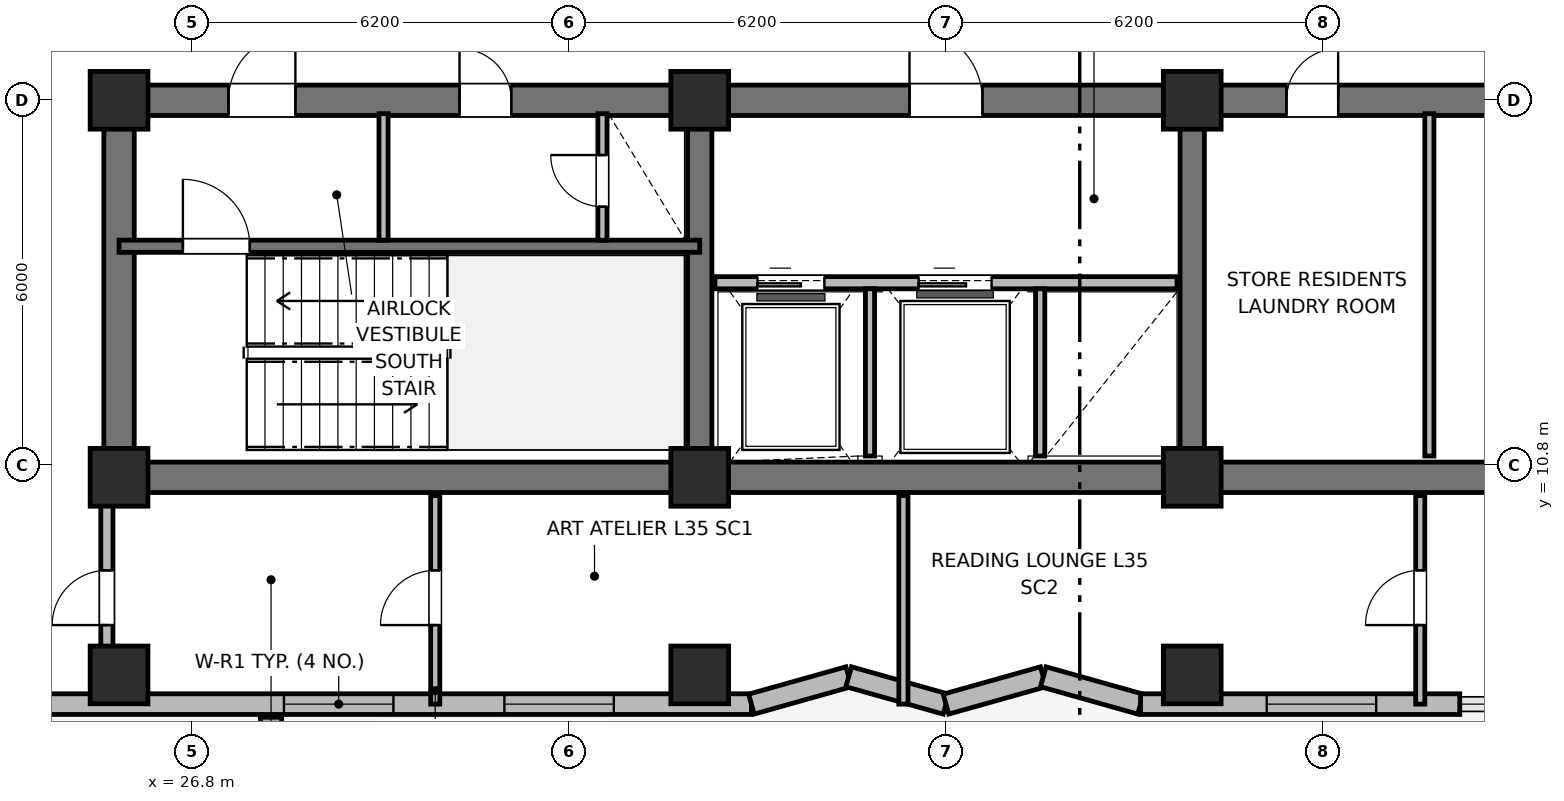
"""IFC4 building model, lengths in metres.
Left out: names, types, materials, properties, quantities, classifications, styles, units other than length and angle.
Written with IfcOpenShell. Run it as: python <this file> out.ifc"""

import sys

from ifc_helpers import new_model, si_unit, direction, frame, frame_2d, origin, origin_2d, place, context, subcontext, project, spatial, rectangle, extrude, element, fill, save


model = new_model("IFC4")
c1 = context("Model", 3, precision=1e-05, world=origin(), true_north=direction((0.0, 1.0)))
c2 = subcontext(c1, "Body", "Model", "MODEL_VIEW")
j1 = project(units=[si_unit("LENGTHUNIT", "METRE"), si_unit("PLANEANGLEUNIT", "RADIAN")], contexts=[c1])
p1 = place(None, origin())
s1 = spatial("IfcSite", under=j1, at=p1, CompositionType="ELEMENT")
p2 = place(p1, origin())
s2 = spatial("IfcBuilding", under=s1, at=p2, CompositionType="ELEMENT")
p3 = place(p2, frame((0.0, 0.0, 143.6)))
s3 = spatial("IfcBuildingStorey", under=s2, at=p3, CompositionType="ELEMENT", Elevation=143.6)
p4 = place(p3, frame((52.8, 10.6, 0.0), z_axis=(0.0, 0.0, 1.0), x_axis=(-1.0, 0.0, 0.0)))
e1 = element("IfcWall", 1, at=p4, inside=s3, PredefinedType="SHEAR", context=c2, shape_type="SweptSolid", body=[
    extrude(rectangle(XDim=27.2, YDim=0.5, at=frame_2d((13.6, 0.0))), origin(), (0.0, 0.0, 1.0), 4.2),
])
p5 = place(p3, frame((25.6, 10.85, 0.0), z_axis=(0.0, 0.0, 1.0), x_axis=(0.0, 1.0, 0.0)))
e2 = element("IfcWall", 2, at=p5, inside=s3, PredefinedType="SHEAR", context=c2, shape_type="SweptSolid", body=[
    extrude(rectangle(XDim=5.7, YDim=0.5, at=frame_2d((2.85, 0.0))), origin(), (0.0, 0.0, 1.0), 4.2),
])
p6 = place(p3, frame((25.6, 16.8, 0.0), z_axis=(0.0, 0.0, 1.0), x_axis=(1.0, 0.0, 0.0)))
e3 = element("IfcWall", 3, at=p6, inside=s3, PredefinedType="SHEAR", context=c2, shape_type="SweptSolid", body=[
    extrude(rectangle(XDim=27.2, YDim=0.5, at=frame_2d((13.6, 0.0))), origin(), (0.0, 0.0, 1.0), 4.2),
])
p7 = place(p6, frame((1.8, 0.0, 0.0)))
e4 = element("IfcOpeningElement", 4, at=p7, cuts=e3, PredefinedType="OPENING", context=c2, shape_type="SweptSolid", body=[
    extrude(rectangle(XDim=1.1, YDim=2.15, at=frame_2d((0.55, 1.075))), frame((0.0, 0.26, 0.0), z_axis=(0.0, -1.0, 0.0), x_axis=(1.0, 0.0, 0.0)), (0.0, 0.0, 1.0), 0.52),
])
p8 = place(p6, frame((5.6, 0.0, 0.0)))
e5 = element("IfcOpeningElement", 5, at=p8, cuts=e3, PredefinedType="OPENING", context=c2, shape_type="SweptSolid", body=[
    extrude(rectangle(XDim=0.85, YDim=2.1, at=frame_2d((0.425, 1.05))), frame((0.0, 0.26, 0.0), z_axis=(0.0, -1.0, 0.0), x_axis=(1.0, 0.0, 0.0)), (0.0, 0.0, 1.0), 0.52),
])
p9 = place(p6, frame((13.0, 0.0, 0.0)))
e6 = element("IfcOpeningElement", 6, at=p9, cuts=e3, PredefinedType="OPENING", context=c2, shape_type="SweptSolid", body=[
    extrude(rectangle(XDim=1.2, YDim=2.15, at=frame_2d((0.6, 1.075))), frame((0.0, 0.26, 0.0), z_axis=(0.0, -1.0, 0.0), x_axis=(1.0, 0.0, 0.0)), (0.0, 0.0, 1.0), 0.52),
])
p10 = place(p6, frame((19.2, 0.0, 0.0)))
e7 = element("IfcOpeningElement", 7, at=p10, cuts=e3, PredefinedType="OPENING", context=c2, shape_type="SweptSolid", body=[
    extrude(rectangle(XDim=0.85, YDim=2.1, at=frame_2d((0.425, 1.05))), frame((0.0, 0.26, 0.0), z_axis=(0.0, -1.0, 0.0), x_axis=(1.0, 0.0, 0.0)), (0.0, 0.0, 1.0), 0.52),
])
p11 = place(p6, frame((23.8, 0.0, 0.0)))
e8 = element("IfcOpeningElement", 8, at=p11, cuts=e3, PredefinedType="OPENING", context=c2, shape_type="SweptSolid", body=[
    extrude(rectangle(XDim=0.9, YDim=2.1, at=frame_2d((0.45, 1.05))), frame((0.0, 0.26, 0.0), z_axis=(0.0, -1.0, 0.0), x_axis=(1.0, 0.0, 0.0)), (0.0, 0.0, 1.0), 0.52),
])
for number, where, z_axis, x_axis in (
    (9, (35.15, 10.85, 0.0), (0.0, 0.0, 1.0), (0.0, 1.0, 0.0)),
    (10, (43.25, 10.85, 0.0), (0.0, 0.0, 1.0), (0.0, 1.0, 0.0)),
):
    element("IfcWall", number, at=place(p3, frame(where, z_axis=z_axis, x_axis=x_axis)), inside=s3, PredefinedType="SHEAR", context=c2, shape_type="SweptSolid", body=[
        extrude(rectangle(XDim=5.7, YDim=0.4, at=frame_2d((2.85, 0.0))), origin(), (0.0, 0.0, 1.0), 4.2),
    ])
for number, where, z_axis, x_axis in (
    (11, (25.6, 10.6, 0.0), (0.0, 0.0, 1.0), (1.0, 0.0, 0.0)),
    (12, (25.6, 16.8, 0.0), (0.0, 0.0, 1.0), (1.0, 0.0, 0.0)),
    (13, (35.15, 10.6, 0.0), (0.0, 0.0, 1.0), (1.0, 0.0, 0.0)),
    (14, (35.15, 16.8, 0.0), (0.0, 0.0, 1.0), (1.0, 0.0, 0.0)),
    (15, (43.25, 10.6, 0.0), (0.0, 0.0, 1.0), (1.0, 0.0, 0.0)),
    (16, (43.25, 16.8, 0.0), (0.0, 0.0, 1.0), (1.0, 0.0, 0.0)),
    (17, (25.6, 7.35, 0.0), (0.0, 0.0, 1.0), (1.0, 0.0, 0.0)),
    (18, (35.15, 7.35, 0.0), (0.0, 0.0, 1.0), (1.0, 0.0, 0.0)),
    (19, (43.25, 7.35, 0.0), (0.0, 0.0, 1.0), (1.0, 0.0, 0.0)),
):
    element("IfcColumn", number, at=place(p3, frame(where, z_axis=z_axis, x_axis=x_axis)), inside=s3, PredefinedType="COLUMN", context=c2, shape_type="SweptSolid", body=[
        extrude(rectangle(XDim=0.95, YDim=0.95, at=origin_2d()), origin(), (0.0, 0.0, 1.0), 4.2),
    ])
p12 = place(p3, frame((20.2, 6.87, 0.0), z_axis=(0.0, 0.0, 1.0), x_axis=(1.0, 0.0, 0.0)))
e20 = element("IfcWall", 20, at=p12, inside=s3, PredefinedType="SOLIDWALL", context=c2, shape_type="SweptSolid", body=[
    extrude(rectangle(XDim=15.8, YDim=0.34, at=frame_2d((7.9, 0.0))), origin(), (0.0, 0.0, 1.0), 3.22),
])
p13 = place(p12, frame((8.113, 0.0, 0.85)))
e21 = element("IfcOpeningElement", 21, at=p13, cuts=e20, PredefinedType="OPENING", context=c2, shape_type="SweptSolid", body=[
    extrude(rectangle(XDim=1.8, YDim=1.85, at=frame_2d((0.9, 0.925))), frame((0.0, 0.18, 0.0), z_axis=(0.0, -1.0, 0.0), x_axis=(1.0, 0.0, 0.0)), (0.0, 0.0, 1.0), 0.36),
])
p14 = place(p12, frame((11.738, 0.0, 0.85)))
e22 = element("IfcOpeningElement", 22, at=p14, cuts=e20, PredefinedType="OPENING", context=c2, shape_type="SweptSolid", body=[
    extrude(rectangle(XDim=1.8, YDim=1.85, at=frame_2d((0.9, 0.925))), frame((0.0, 0.18, 0.0), z_axis=(0.0, -1.0, 0.0), x_axis=(1.0, 0.0, 0.0)), (0.0, 0.0, 1.0), 0.36),
])
p15 = place(p3, frame((36.0, 6.87, 0.0), z_axis=(0.0, 0.0, 1.0), x_axis=(0.962662902433, 0.270703040766, 0.0)))
e23 = element("IfcWall", 23, at=p15, inside=s3, PredefinedType="SOLIDWALL", context=c2, shape_type="SweptSolid", body=[
    extrude(rectangle(XDim=1.662, YDim=0.34, at=frame_2d((0.831, 0.0))), origin(), (0.0, 0.0, 1.0), 3.22),
])
p16 = place(p3, frame((37.6, 7.32, 0.0), z_axis=(0.0, 0.0, 1.0), x_axis=(0.962652136636, -0.270741322725, 0.0)))
e24 = element("IfcWall", 24, at=p16, inside=s3, PredefinedType="SOLIDWALL", context=c2, shape_type="SweptSolid", body=[
    extrude(rectangle(XDim=1.662, YDim=0.34, at=frame_2d((0.831, 0.0))), origin(), (0.0, 0.0, 1.0), 3.22),
])
p17 = place(p3, frame((39.2, 6.87, 0.0), z_axis=(0.0, 0.0, 1.0), x_axis=(0.962662902433, 0.270703040766, 0.0)))
e25 = element("IfcWall", 25, at=p17, inside=s3, PredefinedType="SOLIDWALL", context=c2, shape_type="SweptSolid", body=[
    extrude(rectangle(XDim=1.662, YDim=0.34, at=frame_2d((0.831, 0.0))), origin(), (0.0, 0.0, 1.0), 3.22),
])
p18 = place(p3, frame((40.8, 7.32, 0.0), z_axis=(0.0, 0.0, 1.0), x_axis=(0.962652136636, -0.270741322725, 0.0)))
e26 = element("IfcWall", 26, at=p18, inside=s3, PredefinedType="SOLIDWALL", context=c2, shape_type="SweptSolid", body=[
    extrude(rectangle(XDim=1.662, YDim=0.34, at=frame_2d((0.831, 0.0))), origin(), (0.0, 0.0, 1.0), 3.22),
])
p19 = place(p3, frame((42.4, 6.87, 0.0), z_axis=(0.0, 0.0, 1.0), x_axis=(1.0, 0.0, 0.0)))
e27 = element("IfcWall", 27, at=p19, inside=s3, PredefinedType="SOLIDWALL", context=c2, shape_type="SweptSolid", body=[
    extrude(rectangle(XDim=5.25, YDim=0.34, at=frame_2d((2.625, 0.0))), origin(), (0.0, 0.0, 1.0), 3.22),
])
p20 = place(p19, frame((2.075, 0.0, 0.85)))
e28 = element("IfcOpeningElement", 28, at=p20, cuts=e27, PredefinedType="OPENING", context=c2, shape_type="SweptSolid", body=[
    extrude(rectangle(XDim=1.8, YDim=1.85, at=frame_2d((0.9, 0.925))), frame((0.0, 0.18, 0.0), z_axis=(0.0, -1.0, 0.0), x_axis=(1.0, 0.0, 0.0)), (0.0, 0.0, 1.0), 0.36),
])
p21 = place(p3, frame((25.6, 14.4, 0.0), z_axis=(0.0, 0.0, 1.0), x_axis=(1.0, 0.0, 0.0)))
e29 = element("IfcWall", 29, at=p21, inside=s3, PredefinedType="SHEAR", context=c2, shape_type="SweptSolid", body=[
    extrude(rectangle(XDim=9.55, YDim=0.2, at=frame_2d((4.775, 0.0))), origin(), (0.0, 0.0, 1.0), 4.2),
])
p22 = place(p21, frame((1.05, 0.0, 0.0)))
e30 = element("IfcOpeningElement", 30, at=p22, cuts=e29, PredefinedType="OPENING", context=c2, shape_type="SweptSolid", body=[
    extrude(rectangle(XDim=1.1, YDim=2.15, at=frame_2d((0.55, 1.075))), frame((0.0, 0.11, 0.0), z_axis=(0.0, -1.0, 0.0), x_axis=(1.0, 0.0, 0.0)), (0.0, 0.0, 1.0), 0.22),
])
p23 = place(p3, frame((29.95, 14.5, 0.0), z_axis=(0.0, 0.0, 1.0), x_axis=(0.0, 1.0, 0.0)))
e31 = element("IfcWall", 31, at=p23, inside=s3, PredefinedType="PARTITIONING", context=c2, shape_type="SweptSolid", body=[
    extrude(rectangle(XDim=2.08, YDim=0.15, at=frame_2d((1.04, 0.0))), origin(), (0.0, 0.0, 1.0), 3.05),
])
p24 = place(p3, frame((33.55, 14.5, 0.0), z_axis=(0.0, 0.0, 1.0), x_axis=(0.0, 1.0, 0.0)))
e32 = element("IfcWall", 32, at=p24, inside=s3, PredefinedType="PARTITIONING", context=c2, shape_type="SweptSolid", body=[
    extrude(rectangle(XDim=2.08, YDim=0.15, at=frame_2d((1.04, 0.0))), origin(), (0.0, 0.0, 1.0), 3.05),
])
p25 = place(p24, frame((0.55, 0.0, 0.0)))
e33 = element("IfcOpeningElement", 33, at=p25, cuts=e32, PredefinedType="OPENING", context=c2, shape_type="SweptSolid", body=[
    extrude(rectangle(XDim=0.85, YDim=2.05, at=frame_2d((0.425, 1.025))), frame((0.0, 0.085, 0.0), z_axis=(0.0, -1.0, 0.0), x_axis=(1.0, 0.0, 0.0)), (0.0, 0.0, 1.0), 0.17),
])
p26 = place(p3, frame((35.4, 13.8, 0.0), z_axis=(0.0, 0.0, 1.0), x_axis=(1.0, 0.0, 0.0)))
e34 = element("IfcWall", 34, at=p26, inside=s3, PredefinedType="PARTITIONING", context=c2, shape_type="SweptSolid", body=[
    extrude(rectangle(XDim=7.6, YDim=0.2, at=frame_2d((3.8, 0.0))), origin(), (0.0, 0.0, 1.0), 2.82),
])
p27 = place(p26, frame((0.7, 0.0, 0.0)))
e35 = element("IfcOpeningElement", 35, at=p27, cuts=e34, PredefinedType="OPENING", context=c2, shape_type="SweptSolid", body=[
    extrude(rectangle(XDim=1.1, YDim=2.15, at=frame_2d((0.55, 1.075))), frame((0.0, 0.11, 0.0), z_axis=(0.0, -1.0, 0.0), x_axis=(1.0, 0.0, 0.0)), (0.0, 0.0, 1.0), 0.22),
])
p28 = place(p26, frame((3.35, 0.0, 0.0)))
e36 = element("IfcOpeningElement", 36, at=p28, cuts=e34, PredefinedType="OPENING", context=c2, shape_type="SweptSolid", body=[
    extrude(rectangle(XDim=1.2, YDim=2.15, at=frame_2d((0.6, 1.075))), frame((0.0, 0.11, 0.0), z_axis=(0.0, -1.0, 0.0), x_axis=(1.0, 0.0, 0.0)), (0.0, 0.0, 1.0), 0.22),
])
for number, where, z_axis, x_axis in (
    (37, (37.95, 10.95, 0.0), (0.0, 0.0, 1.0), (0.0, 1.0, 0.0)),
    (38, (40.75, 10.95, 0.0), (0.0, 0.0, 1.0), (0.0, 1.0, 0.0)),
):
    element("IfcWall", number, at=place(p3, frame(where, z_axis=z_axis, x_axis=x_axis)), inside=s3, PredefinedType="PARTITIONING", context=c2, shape_type="SweptSolid", body=[
        extrude(rectangle(XDim=2.75, YDim=0.15, at=frame_2d((1.375, 0.0))), origin(), (0.0, 0.0, 1.0), 3.05),
    ])
p29 = place(p3, frame((47.15, 10.95, 0.0), z_axis=(0.0, 0.0, 1.0), x_axis=(0.0, 1.0, 0.0)))
e39 = element("IfcWall", 39, at=p29, inside=s3, PredefinedType="PARTITIONING", context=c2, shape_type="SweptSolid", body=[
    extrude(rectangle(XDim=5.63, YDim=0.15, at=frame_2d((2.815, 0.0))), origin(), (0.0, 0.0, 1.0), 3.05),
])
p30 = place(p3, frame((30.8, 6.87, 0.0), z_axis=(0.0, 0.0, 1.0), x_axis=(0.0, 1.0, 0.0)))
e40 = element("IfcWall", 40, at=p30, inside=s3, PredefinedType="PARTITIONING", context=c2, shape_type="SweptSolid", body=[
    extrude(rectangle(XDim=3.43, YDim=0.15, at=frame_2d((1.715, 0.0))), origin(), (0.0, 0.0, 1.0), 3.05),
])
p31 = place(p30, frame((1.3, 0.0, 0.0)))
e41 = element("IfcOpeningElement", 41, at=p31, cuts=e40, PredefinedType="OPENING", context=c2, shape_type="SweptSolid", body=[
    extrude(rectangle(XDim=0.9, YDim=2.1, at=frame_2d((0.45, 1.05))), frame((0.0, 0.085, 0.0), z_axis=(0.0, -1.0, 0.0), x_axis=(1.0, 0.0, 0.0)), (0.0, 0.0, 1.0), 0.17),
])
p32 = place(p3, frame((38.5, 6.87, 0.0), z_axis=(0.0, 0.0, 1.0), x_axis=(0.0, 1.0, 0.0)))
e42 = element("IfcWall", 42, at=p32, inside=s3, PredefinedType="PARTITIONING", context=c2, shape_type="SweptSolid", body=[
    extrude(rectangle(XDim=3.43, YDim=0.15, at=frame_2d((1.715, 0.0))), origin(), (0.0, 0.0, 1.0), 3.05),
])
p33 = place(p3, frame((47.0, 6.87, 0.0), z_axis=(0.0, 0.0, 1.0), x_axis=(0.0, 1.0, 0.0)))
e43 = element("IfcWall", 43, at=p33, inside=s3, PredefinedType="PARTITIONING", context=c2, shape_type="SweptSolid", body=[
    extrude(rectangle(XDim=3.43, YDim=0.15, at=frame_2d((1.715, 0.0))), origin(), (0.0, 0.0, 1.0), 3.05),
])
p34 = place(p33, frame((1.3, 0.0, 0.0)))
e44 = element("IfcOpeningElement", 44, at=p34, cuts=e43, PredefinedType="OPENING", context=c2, shape_type="SweptSolid", body=[
    extrude(rectangle(XDim=0.9, YDim=2.1, at=frame_2d((0.45, 1.05))), frame((0.0, 0.085, 0.0), z_axis=(0.0, -1.0, 0.0), x_axis=(1.0, 0.0, 0.0)), (0.0, 0.0, 1.0), 0.17),
])
p35 = place(p3, frame((25.4, 7.52, 0.0), z_axis=(0.0, 0.0, 1.0), x_axis=(0.0, 1.0, 0.0)))
e45 = element("IfcWall", 45, at=p35, inside=s3, PredefinedType="PARTITIONING", context=c2, shape_type="SweptSolid", body=[
    extrude(rectangle(XDim=2.78, YDim=0.2, at=frame_2d((1.39, 0.0))), origin(), (0.0, 0.0, 1.0), 3.05),
])
p36 = place(p35, frame((0.65, 0.0, 0.0)))
e46 = element("IfcOpeningElement", 46, at=p36, cuts=e45, PredefinedType="OPENING", context=c2, shape_type="SweptSolid", body=[
    extrude(rectangle(XDim=0.9, YDim=2.1, at=frame_2d((0.45, 1.05))), frame((0.0, 0.11, 0.0), z_axis=(0.0, -1.0, 0.0), x_axis=(1.0, 0.0, 0.0)), (0.0, 0.0, 1.0), 0.22),
])
p37 = place(p13, origin())
e47 = element("IfcWindow", 47, at=p37, inside=s3, PartitioningType="SINGLE_PANEL", PredefinedType="WINDOW", context=c2, shape_type="SweptSolid", body=[
    extrude(rectangle(XDim=1.8, YDim=1.85, at=frame_2d((0.9, 0.925))), frame((0.0, 0.03, 0.0), z_axis=(0.0, -1.0, 0.0), x_axis=(1.0, 0.0, 0.0)), (0.0, 0.0, 1.0), 0.06),
])
fill(e21, e47)
p38 = place(p14, origin())
e48 = element("IfcWindow", 48, at=p38, inside=s3, PartitioningType="SINGLE_PANEL", PredefinedType="WINDOW", context=c2, shape_type="SweptSolid", body=[
    extrude(rectangle(XDim=1.8, YDim=1.85, at=frame_2d((0.9, 0.925))), frame((0.0, 0.03, 0.0), z_axis=(0.0, -1.0, 0.0), x_axis=(1.0, 0.0, 0.0)), (0.0, 0.0, 1.0), 0.06),
])
fill(e22, e48)
p39 = place(p20, origin())
e49 = element("IfcWindow", 49, at=p39, inside=s3, PartitioningType="SINGLE_PANEL", PredefinedType="WINDOW", context=c2, shape_type="SweptSolid", body=[
    extrude(rectangle(XDim=1.8, YDim=1.85, at=frame_2d((0.9, 0.925))), frame((0.0, 0.03, 0.0), z_axis=(0.0, -1.0, 0.0), x_axis=(1.0, 0.0, 0.0)), (0.0, 0.0, 1.0), 0.06),
])
fill(e28, e49)
p40 = place(p22, origin())
e50 = element("IfcDoor", 50, at=p40, inside=s3, OperationType="SINGLE_SWING_LEFT", PredefinedType="DOOR", context=c2, shape_type="SweptSolid", body=[
    extrude(rectangle(XDim=1.1, YDim=2.15, at=frame_2d((0.55, 1.075))), frame((0.0, 0.025, 0.0), z_axis=(0.0, -1.0, 0.0), x_axis=(1.0, 0.0, 0.0)), (0.0, 0.0, 1.0), 0.05),
])
fill(e30, e50)
p41 = place(p25, origin())
e51 = element("IfcDoor", 51, at=p41, inside=s3, OperationType="SINGLE_SWING_RIGHT", PredefinedType="TRAPDOOR", context=c2, shape_type="SweptSolid", body=[
    extrude(rectangle(XDim=0.85, YDim=2.05, at=frame_2d((0.425, 1.025))), frame((0.0, 0.025, 0.0), z_axis=(0.0, -1.0, 0.0), x_axis=(1.0, 0.0, 0.0)), (0.0, 0.0, 1.0), 0.05),
])
fill(e33, e51)
p42 = place(p27, origin())
e52 = element("IfcDoor", 52, at=p42, inside=s3, OperationType="SLIDING_TO_LEFT", PredefinedType="DOOR", context=c2, shape_type="SweptSolid", body=[
    extrude(rectangle(XDim=1.1, YDim=2.15, at=frame_2d((0.55, 1.075))), frame((0.0, 0.025, 0.0), z_axis=(0.0, -1.0, 0.0), x_axis=(1.0, 0.0, 0.0)), (0.0, 0.0, 1.0), 0.05),
])
fill(e35, e52)
p43 = place(p28, origin())
e53 = element("IfcDoor", 53, at=p43, inside=s3, OperationType="SLIDING_TO_LEFT", PredefinedType="DOOR", context=c2, shape_type="SweptSolid", body=[
    extrude(rectangle(XDim=1.2, YDim=2.15, at=frame_2d((0.6, 1.075))), frame((0.0, 0.025, 0.0), z_axis=(0.0, -1.0, 0.0), x_axis=(1.0, 0.0, 0.0)), (0.0, 0.0, 1.0), 0.05),
])
fill(e36, e53)
p44 = place(p31, origin())
e54 = element("IfcDoor", 54, at=p44, inside=s3, OperationType="SINGLE_SWING_LEFT", PredefinedType="DOOR", context=c2, shape_type="SweptSolid", body=[
    extrude(rectangle(XDim=0.9, YDim=2.1, at=frame_2d((0.45, 1.05))), frame((0.0, 0.025, 0.0), z_axis=(0.0, -1.0, 0.0), x_axis=(1.0, 0.0, 0.0)), (0.0, 0.0, 1.0), 0.05),
])
fill(e41, e54)
p45 = place(p34, origin())
e55 = element("IfcDoor", 55, at=p45, inside=s3, OperationType="SINGLE_SWING_LEFT", PredefinedType="DOOR", context=c2, shape_type="SweptSolid", body=[
    extrude(rectangle(XDim=0.9, YDim=2.1, at=frame_2d((0.45, 1.05))), frame((0.0, 0.025, 0.0), z_axis=(0.0, -1.0, 0.0), x_axis=(1.0, 0.0, 0.0)), (0.0, 0.0, 1.0), 0.05),
])
fill(e44, e55)
p46 = place(p36, origin())
e56 = element("IfcDoor", 56, at=p46, inside=s3, OperationType="SINGLE_SWING_LEFT", PredefinedType="DOOR", context=c2, shape_type="SweptSolid", body=[
    extrude(rectangle(XDim=0.9, YDim=2.1, at=frame_2d((0.45, 1.05))), frame((0.0, 0.025, 0.0), z_axis=(0.0, -1.0, 0.0), x_axis=(1.0, 0.0, 0.0)), (0.0, 0.0, 1.0), 0.05),
])
fill(e46, e56)
p47 = place(p7, origin())
e57 = element("IfcDoor", 57, at=p47, inside=s3, OperationType="SINGLE_SWING_RIGHT", PredefinedType="DOOR", context=c2, shape_type="SweptSolid", body=[
    extrude(rectangle(XDim=1.1, YDim=2.15, at=frame_2d((0.55, 1.075))), frame((0.0, 0.025, 0.0), z_axis=(0.0, -1.0, 0.0), x_axis=(1.0, 0.0, 0.0)), (0.0, 0.0, 1.0), 0.05),
])
fill(e4, e57)
p48 = place(p8, origin())
e58 = element("IfcDoor", 58, at=p48, inside=s3, OperationType="SINGLE_SWING_LEFT", PredefinedType="DOOR", context=c2, shape_type="SweptSolid", body=[
    extrude(rectangle(XDim=0.85, YDim=2.1, at=frame_2d((0.425, 1.05))), frame((0.0, 0.025, 0.0), z_axis=(0.0, -1.0, 0.0), x_axis=(1.0, 0.0, 0.0)), (0.0, 0.0, 1.0), 0.05),
])
fill(e5, e58)
p49 = place(p9, origin())
e59 = element("IfcDoor", 59, at=p49, inside=s3, OperationType="SINGLE_SWING_LEFT", PredefinedType="DOOR", context=c2, shape_type="SweptSolid", body=[
    extrude(rectangle(XDim=1.2, YDim=2.15, at=frame_2d((0.6, 1.075))), frame((0.0, 0.025, 0.0), z_axis=(0.0, -1.0, 0.0), x_axis=(1.0, 0.0, 0.0)), (0.0, 0.0, 1.0), 0.05),
])
fill(e6, e59)
p50 = place(p10, origin())
e60 = element("IfcDoor", 60, at=p50, inside=s3, OperationType="SINGLE_SWING_RIGHT", PredefinedType="DOOR", context=c2, shape_type="SweptSolid", body=[
    extrude(rectangle(XDim=0.85, YDim=2.1, at=frame_2d((0.425, 1.05))), frame((0.0, 0.025, 0.0), z_axis=(0.0, -1.0, 0.0), x_axis=(1.0, 0.0, 0.0)), (0.0, 0.0, 1.0), 0.05),
])
fill(e7, e60)
save(model, sys.argv[1])
